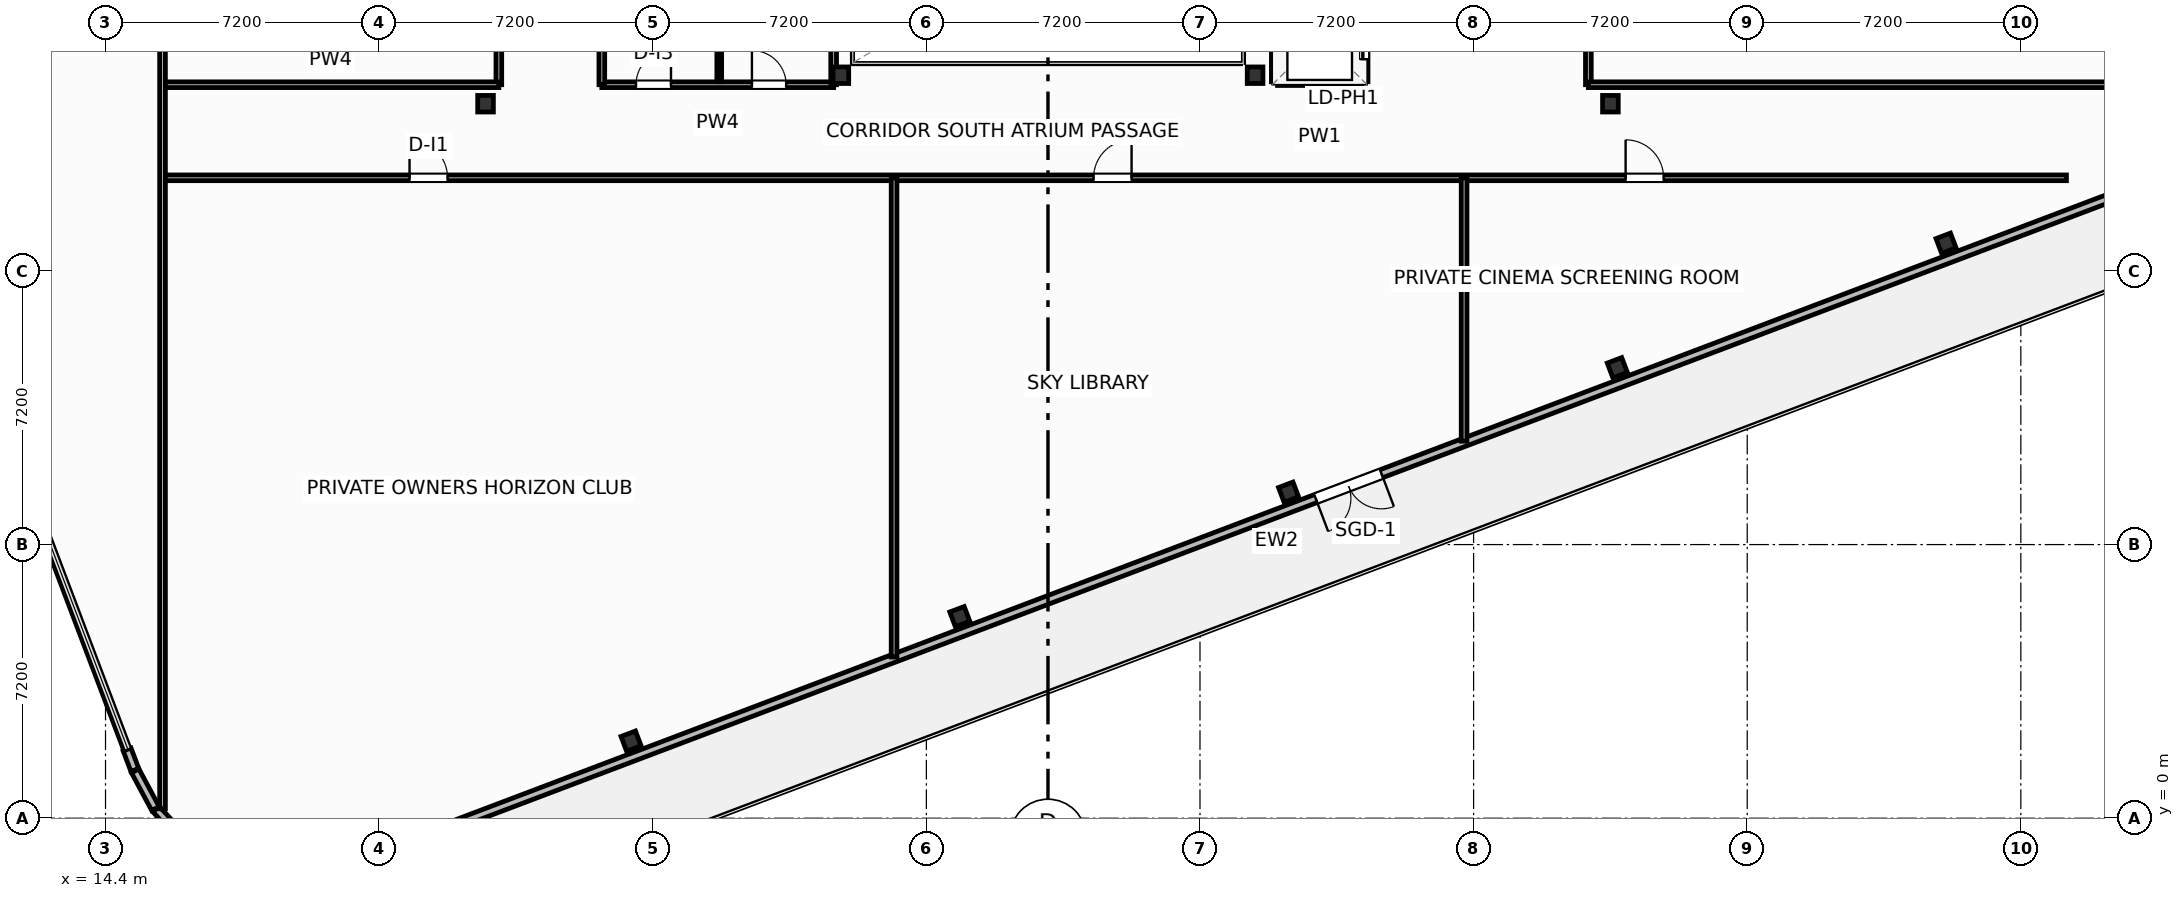
"""IFC4 building model, lengths in metres.
Left out: names, types, materials, properties, quantities, classifications, styles, units other than length and angle.
Written with IfcOpenShell. Run it as: python <this file> out.ifc"""

import sys

from ifc_helpers import new_model, si_unit, direction, frame, frame_2d, origin, origin_2d, place, context, subcontext, project, spatial, rectangle, i_section, extrude, element, fill, save


model = new_model("IFC4")
c1 = context("Model", 3, precision=1e-05, world=origin(), true_north=direction((0.0, 1.0)))
c2 = subcontext(c1, "Body", "Model", "MODEL_VIEW")
j1 = project(units=[si_unit("LENGTHUNIT", "METRE"), si_unit("PLANEANGLEUNIT", "RADIAN")], contexts=[c1])
p1 = place(None, origin())
s1 = spatial("IfcSite", under=j1, at=p1, CompositionType="ELEMENT")
p2 = place(p1, origin())
s2 = spatial("IfcBuilding", under=s1, at=p2, CompositionType="ELEMENT")
p3 = place(p2, frame((0.0, 0.0, 207.9)))
s3 = spatial("IfcBuildingStorey", under=s2, at=p3, CompositionType="ELEMENT", Elevation=207.9)
for number, where, z_axis, x_axis in (
    (1, (33.75, 19.55, 0.0), (0.0, 0.0, 1.0), (1.0, 0.0, 0.0)),
    (2, (44.65, 19.55, 0.0), (0.0, 0.0, 1.0), (1.0, 0.0, 0.0)),
    (3, (24.4, 18.8, 0.0), (0.0, 0.0, 1.0), (1.0, 0.0, 0.0)),
    (4, (54.0, 18.8, 0.0), (0.0, 0.0, 1.0), (1.0, 0.0, 0.0)),
):
    element("IfcColumn", number, at=place(p3, frame(where, z_axis=z_axis, x_axis=x_axis)), inside=s3, PredefinedType="COLUMN", context=c2, shape_type="SweptSolid", body=[
        extrude(i_section(OverallWidth=0.412, OverallDepth=0.435, WebThickness=0.036, FlangeThickness=0.057, FilletRadius=0.025, at=origin_2d()), origin(), (0.0, 0.0, 1.0), 4.8),
    ])
for number, where, z_axis, x_axis in (
    (5, (28.229, 2.028, -0.32), (0.0, 0.0, 1.0), (0.935, 0.354, 0.0)),
    (6, (36.88, 5.303, -0.32), (0.0, 0.0, 1.0), (0.935, 0.354, 0.0)),
    (7, (45.531, 8.578, -0.32), (0.0, 0.0, 1.0), (0.935, 0.354, 0.0)),
    (8, (54.181, 11.853, -0.32), (0.0, 0.0, 1.0), (0.935, 0.354, 0.0)),
    (9, (62.832, 15.128, -0.32), (0.0, 0.0, 1.0), (0.935, 0.354, 0.0)),
):
    element("IfcColumn", number, at=place(p3, frame(where, z_axis=z_axis, x_axis=x_axis)), inside=s3, PredefinedType="COLUMN", context=c2, shape_type="SweptSolid", body=[
        extrude(i_section(OverallWidth=0.406, OverallDepth=0.416, WebThickness=0.03, FlangeThickness=0.048, FilletRadius=0.025, at=origin_2d()), origin(), (0.0, 0.0, 1.0), 5.12),
    ])
p4 = place(p3, frame((70.085, 17.436, 0.0), z_axis=(0.0, 0.0, 1.0), x_axis=(-0.935222646765, -0.354060165759, 0.0)))
e10 = element("IfcWall", 10, at=p4, inside=s3, PredefinedType="SOLIDWALL", context=c2, shape_type="SweptSolid", body=[
    extrude(rectangle(XDim=52.2, YDim=0.22, at=frame_2d((26.1, 0.0))), origin(), (0.0, 0.0, 1.0), 3.83),
])
p5 = place(p4, frame((23.64, 0.0, 0.0)))
e11 = element("IfcOpeningElement", 11, at=p5, cuts=e10, PredefinedType="OPENING", context=c2, shape_type="SweptSolid", body=[
    extrude(rectangle(XDim=1.85, YDim=2.3, at=frame_2d((0.925, 1.15))), frame((0.0, 0.12, 0.0), z_axis=(0.0, -1.0, 0.0), x_axis=(1.0, 0.0, 0.0)), (0.0, 0.0, 1.0), 0.24),
])
p6 = place(p4, frame((0.55, 0.0, 0.75)))
e12 = element("IfcOpeningElement", 12, at=p6, cuts=e10, PredefinedType="OPENING", context=c2, shape_type="SweptSolid", body=[
    extrude(rectangle(XDim=1.85, YDim=1.75, at=frame_2d((0.925, 0.875))), frame((0.0, 0.12, 0.0), z_axis=(0.0, -1.0, 0.0), x_axis=(1.0, 0.0, 0.0)), (0.0, 0.0, 1.0), 0.24),
])
p7 = place(p4, frame((49.8, 0.0, 0.75)))
e13 = element("IfcOpeningElement", 13, at=p7, cuts=e10, PredefinedType="OPENING", context=c2, shape_type="SweptSolid", body=[
    extrude(rectangle(XDim=1.85, YDim=1.75, at=frame_2d((0.925, 0.875))), frame((0.0, 0.12, 0.0), z_axis=(0.0, -1.0, 0.0), x_axis=(1.0, 0.0, 0.0)), (0.0, 0.0, 1.0), 0.24),
])
p8 = place(p3, frame((15.181, 1.245, 0.0), z_axis=(0.0, 0.0, 1.0), x_axis=(0.473154714138, -0.880979350773, 0.0)))
e14 = element("IfcWall", 14, at=p8, inside=s3, PredefinedType="SOLIDWALL", context=c2, shape_type="SweptSolid", body=[
    extrude(rectangle(XDim=1.125, YDim=0.22, at=frame_2d((0.562, 0.0))), origin(), (0.0, 0.0, 1.0), 3.83),
])
p9 = place(p3, frame((15.73, 0.236, 0.0), z_axis=(0.0, 0.0, 1.0), x_axis=(0.684974096147, -0.728567421456, 0.0)))
e15 = element("IfcWall", 15, at=p9, inside=s3, PredefinedType="SOLIDWALL", context=c2, shape_type="SweptSolid", body=[
    extrude(rectangle(XDim=1.092, YDim=0.22, at=frame_2d((0.546, 0.0))), origin(), (0.0, 0.0, 1.0), 3.83),
])
p10 = place(p3, frame((14.968, 1.809, 0.0), z_axis=(0.0, 0.0, 1.0), x_axis=(0.354042098677, -0.935229486471, 0.0)))
e16 = element("IfcWall", 16, at=p10, inside=s3, PredefinedType="SOLIDWALL", context=c2, shape_type="SweptSolid", body=[
    extrude(rectangle(XDim=0.577, YDim=0.22, at=frame_2d((0.289, 0.0))), origin(), (0.0, 0.0, 1.0), 3.83),
])
p11 = place(p3, frame((27.46, 19.3, 0.0), z_axis=(0.0, 0.0, 1.0), x_axis=(1.0, 0.0, 0.0)))
e17 = element("IfcWall", 17, at=p11, inside=s3, PredefinedType="PARTITIONING", context=c2, shape_type="SweptSolid", body=[
    extrude(rectangle(XDim=6.1, YDim=0.15, at=frame_2d((3.05, 0.0))), origin(), (0.0, 0.0, 1.0), 3.762),
])
p12 = place(p11, frame((0.9, 0.0, 0.0)))
e18 = element("IfcOpeningElement", 18, at=p12, cuts=e17, PredefinedType="OPENING", context=c2, shape_type="SweptSolid", body=[
    extrude(rectangle(XDim=0.92, YDim=2.05, at=frame_2d((0.46, 1.025))), frame((0.0, 0.085, 0.0), z_axis=(0.0, -1.0, 0.0), x_axis=(1.0, 0.0, 0.0)), (0.0, 0.0, 1.0), 0.17),
])
p13 = place(p11, frame((3.95, 0.0, 0.0)))
e19 = element("IfcOpeningElement", 19, at=p13, cuts=e17, PredefinedType="OPENING", context=c2, shape_type="SweptSolid", body=[
    extrude(rectangle(XDim=0.9, YDim=2.05, at=frame_2d((0.45, 1.025))), frame((0.0, 0.085, 0.0), z_axis=(0.0, -1.0, 0.0), x_axis=(1.0, 0.0, 0.0)), (0.0, 0.0, 1.0), 0.17),
])
p14 = place(p3, frame((30.55, 19.38, 0.0), z_axis=(0.0, 0.0, 1.0), x_axis=(0.0, 1.0, 0.0)))
e20 = element("IfcWall", 20, at=p14, inside=s3, PredefinedType="PARTITIONING", context=c2, shape_type="SweptSolid", body=[
    extrude(rectangle(XDim=7.18, YDim=0.125, at=frame_2d((3.59, 0.0))), origin(), (0.0, 0.0, 1.0), 4.55),
])
p15 = place(p3, frame((27.46, 19.3, 0.0), z_axis=(0.0, 0.0, 1.0), x_axis=(0.0, 1.0, 0.0)))
e21 = element("IfcWall", 21, at=p15, inside=s3, PredefinedType="PARTITIONING", context=c2, shape_type="SweptSolid", body=[
    extrude(rectangle(XDim=7.34, YDim=0.15, at=frame_2d((3.67, 0.0))), origin(), (0.0, 0.0, 1.0), 4.55),
])
p16 = place(p3, frame((33.56, 19.3, 0.0), z_axis=(0.0, 0.0, 1.0), x_axis=(0.0, 1.0, 0.0)))
e22 = element("IfcWall", 22, at=p16, inside=s3, PredefinedType="PARTITIONING", context=c2, shape_type="SweptSolid", body=[
    extrude(rectangle(XDim=7.34, YDim=0.15, at=frame_2d((3.67, 0.0))), origin(), (0.0, 0.0, 1.0), 3.924),
])
p17 = place(p3, frame((15.9, 16.85, 0.0), z_axis=(0.0, 0.0, 1.0), x_axis=(1.0, 0.0, 0.0)))
e23 = element("IfcWall", 23, at=p17, inside=s3, PredefinedType="PARTITIONING", context=c2, shape_type="SweptSolid", body=[
    extrude(rectangle(XDim=50.1, YDim=0.15, at=frame_2d((25.05, 0.0))), origin(), (0.0, 0.0, 1.0), 4.55),
])
p18 = place(p17, frame((6.5, 0.0, 0.0)))
e24 = element("IfcOpeningElement", 24, at=p18, cuts=e23, PredefinedType="OPENING", context=c2, shape_type="SweptSolid", body=[
    extrude(rectangle(XDim=1.0, YDim=2.05, at=frame_2d((0.5, 1.025))), frame((0.0, 0.085, 0.0), z_axis=(0.0, -1.0, 0.0), x_axis=(1.0, 0.0, 0.0)), (0.0, 0.0, 1.0), 0.17),
])
p19 = place(p17, frame((24.5, 0.0, 0.0)))
e25 = element("IfcOpeningElement", 25, at=p19, cuts=e23, PredefinedType="OPENING", context=c2, shape_type="SweptSolid", body=[
    extrude(rectangle(XDim=1.0, YDim=2.05, at=frame_2d((0.5, 1.025))), frame((0.0, 0.085, 0.0), z_axis=(0.0, -1.0, 0.0), x_axis=(1.0, 0.0, 0.0)), (0.0, 0.0, 1.0), 0.17),
])
p20 = place(p17, frame((38.5, 0.0, 0.0)))
e26 = element("IfcOpeningElement", 26, at=p20, cuts=e23, PredefinedType="OPENING", context=c2, shape_type="SweptSolid", body=[
    extrude(rectangle(XDim=1.0, YDim=2.05, at=frame_2d((0.5, 1.025))), frame((0.0, 0.085, 0.0), z_axis=(0.0, -1.0, 0.0), x_axis=(1.0, 0.0, 0.0)), (0.0, 0.0, 1.0), 0.17),
])
p21 = place(p3, frame((35.15, 4.242, 0.0), z_axis=(0.0, 0.0, 1.0), x_axis=(0.0, 1.0, 0.0)))
e27 = element("IfcWall", 27, at=p21, inside=s3, PredefinedType="PARTITIONING", context=c2, shape_type="SweptSolid", body=[
    extrude(rectangle(XDim=12.608, YDim=0.15, at=frame_2d((6.304, 0.0))), origin(), (0.0, 0.0, 1.0), 3.839),
])
p22 = place(p3, frame((50.15, 9.921, 0.0), z_axis=(0.0, 0.0, 1.0), x_axis=(0.0, 1.0, 0.0)))
e28 = element("IfcWall", 28, at=p22, inside=s3, PredefinedType="PARTITIONING", context=c2, shape_type="SweptSolid", body=[
    extrude(rectangle(XDim=6.929, YDim=0.15, at=frame_2d((3.465, 0.0))), origin(), (0.0, 0.0, 1.0), 4.55),
])
p23 = place(p3, frame((24.75, 19.3, 0.0), z_axis=(0.0, 0.0, 1.0), x_axis=(0.0, 1.0, 0.0)))
e29 = element("IfcWall", 29, at=p23, inside=s3, PredefinedType="PARTITIONING", context=c2, shape_type="SweptSolid", body=[
    extrude(rectangle(XDim=7.34, YDim=0.15, at=frame_2d((3.67, 0.0))), origin(), (0.0, 0.0, 1.0), 4.55),
])
p24 = place(p3, frame((15.9, 19.3, 0.0), z_axis=(0.0, 0.0, 1.0), x_axis=(1.0, 0.0, 0.0)))
e30 = element("IfcWall", 30, at=p24, inside=s3, PredefinedType="PARTITIONING", context=c2, shape_type="SweptSolid", body=[
    extrude(rectangle(XDim=8.85, YDim=0.15, at=frame_2d((4.425, 0.0))), origin(), (0.0, 0.0, 1.0), 4.55),
])
p25 = place(p3, frame((15.9, 0.25, 0.0), z_axis=(0.0, 0.0, 1.0), x_axis=(0.0, 1.0, 0.0)))
e31 = element("IfcWall", 31, at=p25, inside=s3, PredefinedType="PARTITIONING", context=c2, shape_type="SweptSolid", body=[
    extrude(rectangle(XDim=35.754, YDim=0.15, at=frame_2d((17.877, 0.0))), origin(), (0.0, 0.0, 1.0), 4.55),
])
p26 = place(p25, frame((27.2, 0.0, 0.0)))
e32 = element("IfcOpeningElement", 32, at=p26, cuts=e31, PredefinedType="OPENING", context=c2, shape_type="SweptSolid", body=[
    extrude(rectangle(XDim=1.0, YDim=2.05, at=frame_2d((0.5, 1.025))), frame((0.0, 0.085, 0.0), z_axis=(0.0, -1.0, 0.0), x_axis=(1.0, 0.0, 0.0)), (0.0, 0.0, 1.0), 0.17),
])
p27 = place(p3, frame((53.42, 19.3, 0.0), z_axis=(0.0, 0.0, 1.0), x_axis=(0.0, 1.0, 0.0)))
e33 = element("IfcWall", 33, at=p27, inside=s3, PredefinedType="PARTITIONING", context=c2, shape_type="SweptSolid", body=[
    extrude(rectangle(XDim=20.02, YDim=0.15, at=frame_2d((10.01, 0.0))), origin(), (0.0, 0.0, 1.0), 4.55),
])
p28 = place(p27, frame((7.8, 0.0, 0.0)))
e34 = element("IfcOpeningElement", 34, at=p28, cuts=e33, PredefinedType="OPENING", context=c2, shape_type="SweptSolid", body=[
    extrude(rectangle(XDim=1.0, YDim=2.05, at=frame_2d((0.5, 1.025))), frame((0.0, 0.085, 0.0), z_axis=(0.0, -1.0, 0.0), x_axis=(1.0, 0.0, 0.0)), (0.0, 0.0, 1.0), 0.17),
])
p29 = place(p3, frame((53.42, 19.3, 0.0), z_axis=(0.0, 0.0, 1.0), x_axis=(1.0, 0.0, 0.0)))
e35 = element("IfcWall", 35, at=p29, inside=s3, PredefinedType="PARTITIONING", context=c2, shape_type="SweptSolid", body=[
    extrude(rectangle(XDim=19.212, YDim=0.15, at=frame_2d((9.606, 0.0))), origin(), (0.0, 0.0, 1.0), 4.55),
])
p30 = place(p3, frame((45.24, 19.38, 0.0), z_axis=(0.0, 0.0, 1.0), x_axis=(1.0, 0.0, 0.0)))
e36 = element("IfcWall", 36, at=p30, inside=s3, PredefinedType="PARTITIONING", context=c2, shape_type="SweptSolid", body=[
    extrude(rectangle(XDim=2.22, YDim=0.2, at=frame_2d((1.11, 0.0))), origin(), (0.0, 0.0, 1.0), 3.762),
])
p31 = place(p3, frame((45.18, 19.38, 0.0), z_axis=(0.0, 0.0, 1.0), x_axis=(0.0, 1.0, 0.0)))
e37 = element("IfcWall", 37, at=p31, inside=s3, PredefinedType="PARTITIONING", context=c2, shape_type="SweptSolid", body=[
    extrude(rectangle(XDim=6.9, YDim=0.2, at=frame_2d((3.45, 0.0))), origin(), (0.0, 0.0, 1.0), 4.55),
])
p32 = place(p3, frame((47.52, 19.38, 0.0), z_axis=(0.0, 0.0, 1.0), x_axis=(0.0, 1.0, 0.0)))
e38 = element("IfcWall", 38, at=p32, inside=s3, PredefinedType="PARTITIONING", context=c2, shape_type="SweptSolid", body=[
    extrude(rectangle(XDim=6.9, YDim=0.2, at=frame_2d((3.45, 0.0))), origin(), (0.0, 0.0, 1.0), 4.55),
])
p33 = place(p32, frame((0.59, 0.0, 0.0)))
e39 = element("IfcOpeningElement", 39, at=p33, cuts=e38, PredefinedType="OPENING", context=c2, shape_type="SweptSolid", body=[
    extrude(rectangle(XDim=1.1, YDim=2.15, at=frame_2d((0.55, 1.075))), frame((0.0, 0.11, 0.0), z_axis=(0.0, -1.0, 0.0), x_axis=(1.0, 0.0, 0.0)), (0.0, 0.0, 1.0), 0.22),
])
p34 = place(p32, frame((2.89, 0.0, 0.0)))
e40 = element("IfcOpeningElement", 40, at=p34, cuts=e38, PredefinedType="OPENING", context=c2, shape_type="SweptSolid", body=[
    extrude(rectangle(XDim=1.1, YDim=2.15, at=frame_2d((0.55, 1.075))), frame((0.0, 0.11, 0.0), z_axis=(0.0, -1.0, 0.0), x_axis=(1.0, 0.0, 0.0)), (0.0, 0.0, 1.0), 0.22),
])
p35 = place(p32, frame((5.19, 0.0, 0.0)))
e41 = element("IfcOpeningElement", 41, at=p35, cuts=e38, PredefinedType="OPENING", context=c2, shape_type="SweptSolid", body=[
    extrude(rectangle(XDim=1.1, YDim=2.15, at=frame_2d((0.55, 1.075))), frame((0.0, 0.11, 0.0), z_axis=(0.0, -1.0, 0.0), x_axis=(1.0, 0.0, 0.0)), (0.0, 0.0, 1.0), 0.22),
])
p36 = place(p5, origin())
e42 = element("IfcDoor", 42, at=p36, inside=s3, OperationType="DOUBLE_DOOR_SINGLE_SWING", PredefinedType="DOOR", context=c2, shape_type="SweptSolid", body=[
    extrude(rectangle(XDim=1.85, YDim=2.3, at=frame_2d((0.925, 1.15))), frame((0.0, 0.025, 0.0), z_axis=(0.0, -1.0, 0.0), x_axis=(1.0, 0.0, 0.0)), (0.0, 0.0, 1.0), 0.05),
])
fill(e11, e42)
p37 = place(p12, origin())
e43 = element("IfcDoor", 43, at=p37, inside=s3, OperationType="SINGLE_SWING_RIGHT", PredefinedType="DOOR", context=c2, shape_type="SweptSolid", body=[
    extrude(rectangle(XDim=0.92, YDim=2.05, at=frame_2d((0.46, 1.025))), frame((0.0, 0.025, 0.0), z_axis=(0.0, -1.0, 0.0), x_axis=(1.0, 0.0, 0.0)), (0.0, 0.0, 1.0), 0.05),
])
fill(e18, e43)
p38 = place(p13, origin())
e44 = element("IfcDoor", 44, at=p38, inside=s3, OperationType="SINGLE_SWING_LEFT", PredefinedType="DOOR", context=c2, shape_type="SweptSolid", body=[
    extrude(rectangle(XDim=0.9, YDim=2.05, at=frame_2d((0.45, 1.025))), frame((0.0, 0.025, 0.0), z_axis=(0.0, -1.0, 0.0), x_axis=(1.0, 0.0, 0.0)), (0.0, 0.0, 1.0), 0.05),
])
fill(e19, e44)
p39 = place(p18, origin())
e45 = element("IfcDoor", 45, at=p39, inside=s3, OperationType="SINGLE_SWING_LEFT", PredefinedType="DOOR", context=c2, shape_type="SweptSolid", body=[
    extrude(rectangle(XDim=1.0, YDim=2.05, at=frame_2d((0.5, 1.025))), frame((0.0, 0.025, 0.0), z_axis=(0.0, -1.0, 0.0), x_axis=(1.0, 0.0, 0.0)), (0.0, 0.0, 1.0), 0.05),
])
fill(e24, e45)
p40 = place(p19, origin())
e46 = element("IfcDoor", 46, at=p40, inside=s3, OperationType="SINGLE_SWING_RIGHT", PredefinedType="DOOR", context=c2, shape_type="SweptSolid", body=[
    extrude(rectangle(XDim=1.0, YDim=2.05, at=frame_2d((0.5, 1.025))), frame((0.0, 0.025, 0.0), z_axis=(0.0, -1.0, 0.0), x_axis=(1.0, 0.0, 0.0)), (0.0, 0.0, 1.0), 0.05),
])
fill(e25, e46)
p41 = place(p20, origin())
e47 = element("IfcDoor", 47, at=p41, inside=s3, OperationType="SINGLE_SWING_LEFT", PredefinedType="DOOR", context=c2, shape_type="SweptSolid", body=[
    extrude(rectangle(XDim=1.0, YDim=2.05, at=frame_2d((0.5, 1.025))), frame((0.0, 0.025, 0.0), z_axis=(0.0, -1.0, 0.0), x_axis=(1.0, 0.0, 0.0)), (0.0, 0.0, 1.0), 0.05),
])
fill(e26, e47)
p42 = place(p33, origin())
e48 = element("IfcDoor", 48, at=p42, inside=s3, OperationType="SLIDING_TO_LEFT", PredefinedType="DOOR", context=c2, shape_type="SweptSolid", body=[
    extrude(rectangle(XDim=1.1, YDim=2.15, at=frame_2d((0.55, 1.075))), frame((0.0, 0.025, 0.0), z_axis=(0.0, -1.0, 0.0), x_axis=(1.0, 0.0, 0.0)), (0.0, 0.0, 1.0), 0.05),
])
fill(e39, e48)
save(model, sys.argv[1])
